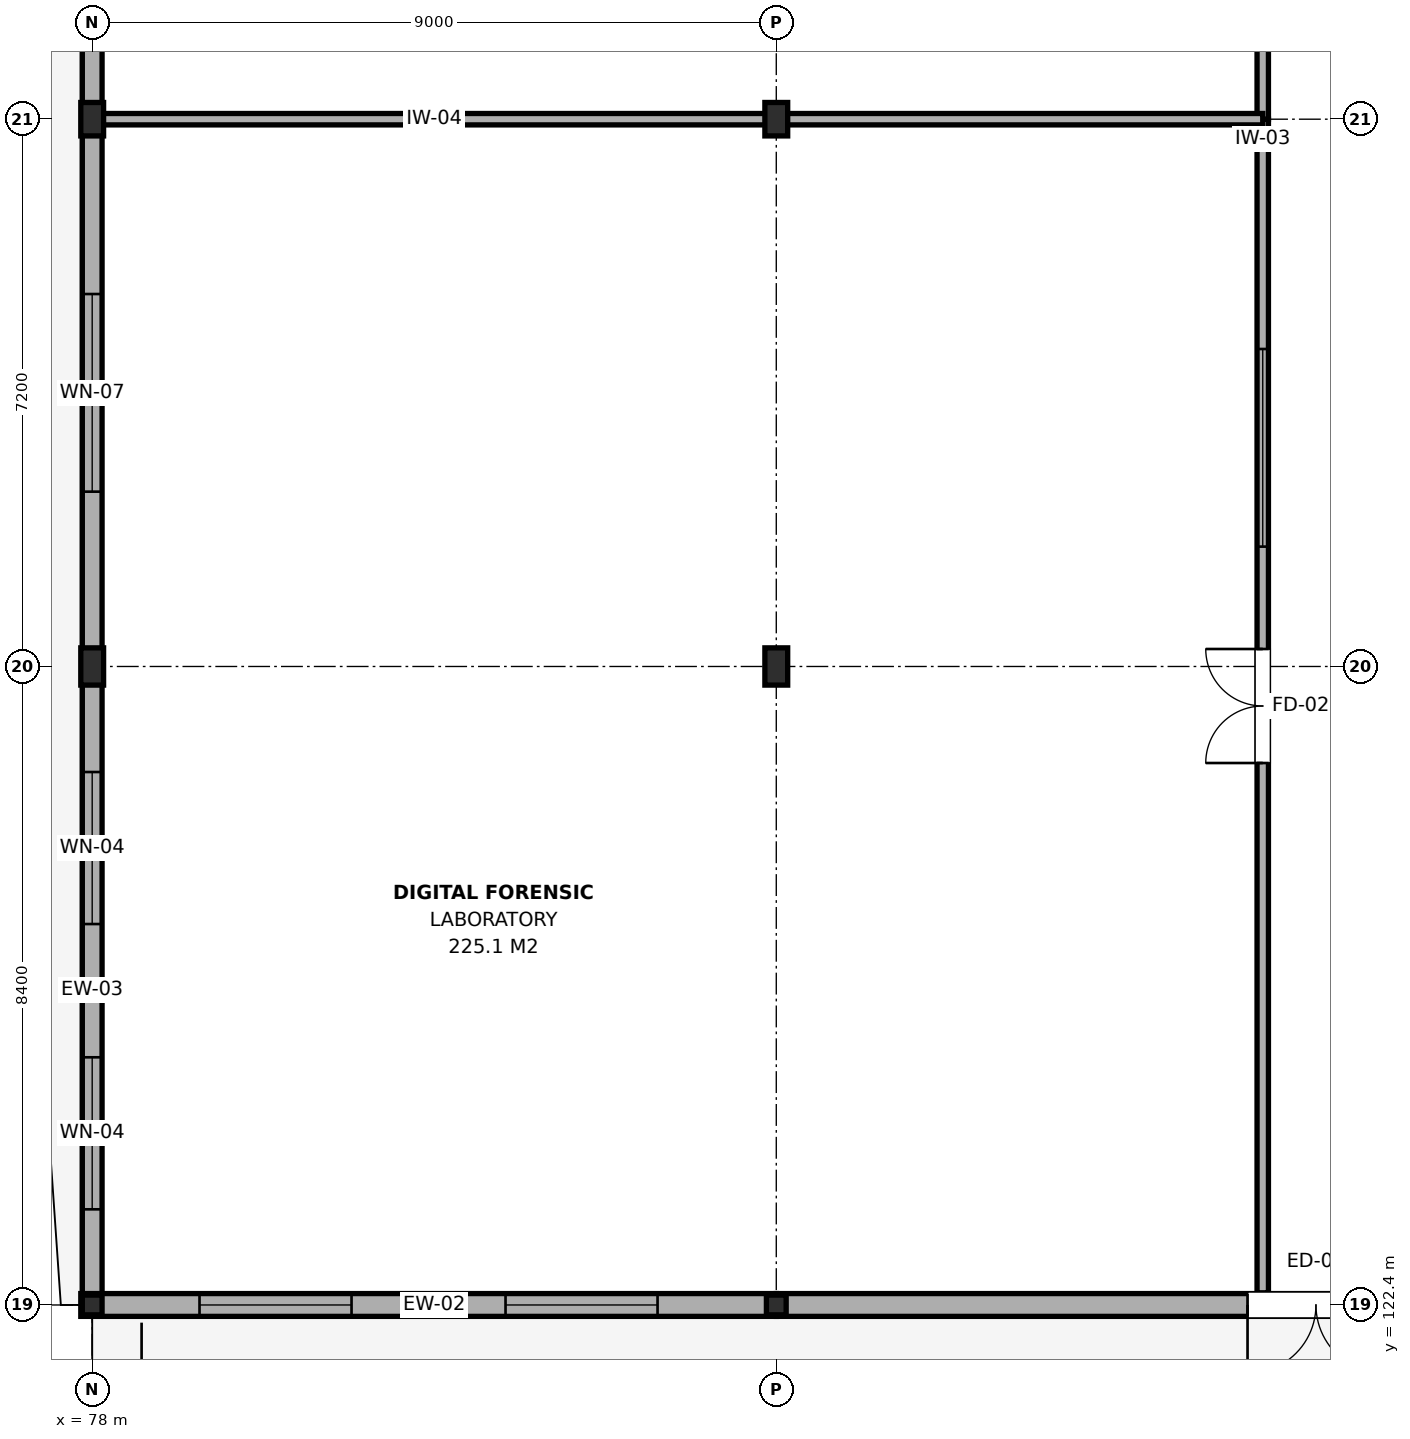
"""IFC4 building model, lengths in metres.
Left out: names, types, materials, properties, quantities, classifications, styles, units other than length and angle.
Written with IfcOpenShell. Run it as: python <this file> out.ifc"""

import sys

from ifc_helpers import new_model, si_unit, direction, frame, frame_2d, origin, origin_2d, place, context, subcontext, project, spatial, rectangle, i_section, extrude, element, fill, save


model = new_model("IFC4")
c1 = context("Model", 3, precision=1e-05, world=origin(), true_north=direction((0.0, 1.0)))
c2 = subcontext(c1, "Body", "Model", "MODEL_VIEW")
j1 = project(units=[si_unit("LENGTHUNIT", "METRE"), si_unit("PLANEANGLEUNIT", "RADIAN")], contexts=[c1])
p1 = place(None, origin())
s1 = spatial("IfcSite", under=j1, at=p1, CompositionType="ELEMENT")
p2 = place(p1, origin())
s2 = spatial("IfcBuilding", under=s1, at=p2, CompositionType="ELEMENT")
p3 = place(p2, frame((0.0, 0.0, 13.2)))
s3 = spatial("IfcBuildingStorey", under=s2, at=p3, CompositionType="ELEMENT", Elevation=13.2)
p4 = place(p3, frame((78.0, 122.4, 0.0), z_axis=(0.0, 0.0, 1.0), x_axis=(1.0, 0.0, 0.0)))
e1 = element("IfcColumn", 1, at=p4, inside=s3, PredefinedType="COLUMN", context=c2, shape_type="SweptSolid", body=[
    extrude(i_section(OverallWidth=0.26, OverallDepth=0.26, WebThickness=0.01, FlangeThickness=0.018, FilletRadius=0.024, at=origin_2d()), origin(), (0.0, 0.0, 1.0), 3.9),
])
p5 = place(p3, frame((78.0, 130.8, 0.0), z_axis=(0.0, 0.0, 1.0), x_axis=(1.0, 0.0, 0.0)))
e2 = element("IfcColumn", 2, at=p5, inside=s3, PredefinedType="COLUMN", context=c2, shape_type="SweptSolid", body=[
    extrude(i_section(OverallWidth=0.3, OverallDepth=0.49, WebThickness=0.012, FlangeThickness=0.023, FilletRadius=0.027, at=origin_2d()), origin(), (0.0, 0.0, 1.0), 3.9),
])
p6 = place(p3, frame((78.0, 138.0, 0.0), z_axis=(0.0, 0.0, 1.0), x_axis=(1.0, 0.0, 0.0)))
e3 = element("IfcColumn", 3, at=p6, inside=s3, PredefinedType="COLUMN", context=c2, shape_type="SweptSolid", body=[
    extrude(i_section(OverallWidth=0.3, OverallDepth=0.44, WebThickness=0.011, FlangeThickness=0.021, FilletRadius=0.027, at=origin_2d()), origin(), (0.0, 0.0, 1.0), 3.9),
])
p7 = place(p3, frame((87.0, 122.4, 0.0), z_axis=(0.0, 0.0, 1.0), x_axis=(1.0, 0.0, 0.0)))
e4 = element("IfcColumn", 4, at=p7, inside=s3, PredefinedType="COLUMN", context=c2, shape_type="SweptSolid", body=[
    extrude(i_section(OverallWidth=0.26, OverallDepth=0.26, WebThickness=0.01, FlangeThickness=0.018, FilletRadius=0.024, at=origin_2d()), origin(), (0.0, 0.0, 1.0), 3.9),
])
p8 = place(p3, frame((87.0, 130.8, 0.0), z_axis=(0.0, 0.0, 1.0), x_axis=(1.0, 0.0, 0.0)))
e5 = element("IfcColumn", 5, at=p8, inside=s3, PredefinedType="COLUMN", context=c2, shape_type="SweptSolid", body=[
    extrude(i_section(OverallWidth=0.3, OverallDepth=0.49, WebThickness=0.012, FlangeThickness=0.023, FilletRadius=0.027, at=origin_2d()), origin(), (0.0, 0.0, 1.0), 3.9),
])
p9 = place(p3, frame((87.0, 138.0, 0.0), z_axis=(0.0, 0.0, 1.0), x_axis=(1.0, 0.0, 0.0)))
e6 = element("IfcColumn", 6, at=p9, inside=s3, PredefinedType="COLUMN", context=c2, shape_type="SweptSolid", body=[
    extrude(i_section(OverallWidth=0.3, OverallDepth=0.44, WebThickness=0.011, FlangeThickness=0.021, FilletRadius=0.027, at=origin_2d()), origin(), (0.0, 0.0, 1.0), 3.9),
])
p10 = place(p3, frame((78.0, 122.27, 0.0), z_axis=(0.0, 0.0, 1.0), x_axis=(0.0, 1.0, 0.0)))
e7 = element("IfcWall", 7, at=p10, inside=s3, PredefinedType="SOLIDWALL", context=c2, shape_type="SweptSolid", body=[
    extrude(rectangle(XDim=8.53, YDim=0.26, at=frame_2d((4.265, 0.0))), origin(), (0.0, 0.0, 1.0), 3.095),
])
p11 = place(p10, frame((1.388, 0.0, 1.05)))
e8 = element("IfcOpeningElement", 8, at=p11, cuts=e7, PredefinedType="OPENING", context=c2, shape_type="SweptSolid", body=[
    extrude(rectangle(XDim=2.0, YDim=1.8, at=frame_2d((1.0, 0.9))), frame((0.0, 0.145, 0.0), z_axis=(0.0, -1.0, 0.0), x_axis=(1.0, 0.0, 0.0)), (0.0, 0.0, 1.0), 0.29),
])
p12 = place(p10, frame((5.142, 0.0, 1.05)))
e9 = element("IfcOpeningElement", 9, at=p12, cuts=e7, PredefinedType="OPENING", context=c2, shape_type="SweptSolid", body=[
    extrude(rectangle(XDim=2.0, YDim=1.8, at=frame_2d((1.0, 0.9))), frame((0.0, 0.145, 0.0), z_axis=(0.0, -1.0, 0.0), x_axis=(1.0, 0.0, 0.0)), (0.0, 0.0, 1.0), 0.29),
])
p13 = place(p3, frame((78.0, 130.8, 0.0), z_axis=(0.0, 0.0, 1.0), x_axis=(0.0, 1.0, 0.0)))
e10 = element("IfcWall", 10, at=p13, inside=s3, PredefinedType="SOLIDWALL", context=c2, shape_type="SweptSolid", body=[
    extrude(rectangle(XDim=7.2, YDim=0.26, at=frame_2d((3.6, 0.0))), origin(), (0.0, 0.0, 1.0), 3.095),
])
p14 = place(p13, frame((2.3, 0.0, 1.05)))
e11 = element("IfcOpeningElement", 11, at=p14, cuts=e10, PredefinedType="OPENING", context=c2, shape_type="SweptSolid", body=[
    extrude(rectangle(XDim=2.6, YDim=1.5, at=frame_2d((1.3, 0.75))), frame((0.0, 0.145, 0.0), z_axis=(0.0, -1.0, 0.0), x_axis=(1.0, 0.0, 0.0)), (0.0, 0.0, 1.0), 0.29),
])
p15 = place(p3, frame((78.0, 138.0, 0.0), z_axis=(0.0, 0.0, 1.0), x_axis=(0.0, 1.0, 0.0)))
e12 = element("IfcWall", 12, at=p15, inside=s3, PredefinedType="SOLIDWALL", context=c2, shape_type="SweptSolid", body=[
    extrude(rectangle(XDim=7.2, YDim=0.26, at=frame_2d((3.6, 0.0))), origin(), (0.0, 0.0, 1.0), 3.095),
])
p16 = place(p15, frame((2.3, 0.0, 1.05)))
e13 = element("IfcOpeningElement", 13, at=p16, cuts=e12, PredefinedType="OPENING", context=c2, shape_type="SweptSolid", body=[
    extrude(rectangle(XDim=2.6, YDim=1.5, at=frame_2d((1.3, 0.75))), frame((0.0, 0.145, 0.0), z_axis=(0.0, -1.0, 0.0), x_axis=(1.0, 0.0, 0.0)), (0.0, 0.0, 1.0), 0.29),
])
p17 = place(p3, frame((77.85, 122.4, 0.0), z_axis=(0.0, 0.0, 1.0), x_axis=(1.0, 0.0, 0.0)))
e14 = element("IfcWall", 14, at=p17, inside=s3, PredefinedType="SOLIDWALL", context=c2, shape_type="SweptSolid", body=[
    extrude(rectangle(XDim=9.15, YDim=0.3, at=frame_2d((4.575, 0.0))), origin(), (0.0, 0.0, 1.0), 3.205),
])
p18 = place(p17, frame((1.562, 0.0, 0.65)))
e15 = element("IfcOpeningElement", 15, at=p18, cuts=e14, PredefinedType="OPENING", context=c2, shape_type="SweptSolid", body=[
    extrude(rectangle(XDim=2.0, YDim=1.8, at=frame_2d((1.0, 0.9))), frame((0.0, 0.165, 0.0), z_axis=(0.0, -1.0, 0.0), x_axis=(1.0, 0.0, 0.0)), (0.0, 0.0, 1.0), 0.33),
])
p19 = place(p17, frame((5.588, 0.0, 0.65)))
e16 = element("IfcOpeningElement", 16, at=p19, cuts=e14, PredefinedType="OPENING", context=c2, shape_type="SweptSolid", body=[
    extrude(rectangle(XDim=2.0, YDim=1.8, at=frame_2d((1.0, 0.9))), frame((0.0, 0.165, 0.0), z_axis=(0.0, -1.0, 0.0), x_axis=(1.0, 0.0, 0.0)), (0.0, 0.0, 1.0), 0.33),
])
p20 = place(p3, frame((87.0, 122.4, 0.0), z_axis=(0.0, 0.0, 1.0), x_axis=(1.0, 0.0, 0.0)))
e17 = element("IfcWall", 17, at=p20, inside=s3, PredefinedType="SOLIDWALL", context=c2, shape_type="SweptSolid", body=[
    extrude(rectangle(XDim=9.0, YDim=0.3, at=frame_2d((4.5, 0.0))), origin(), (0.0, 0.0, 1.0), 3.205),
])
p21 = place(p20, frame((6.2, 0.0, 0.0)))
e18 = element("IfcOpeningElement", 18, at=p21, cuts=e17, PredefinedType="OPENING", context=c2, shape_type="SweptSolid", body=[
    extrude(rectangle(XDim=1.8, YDim=2.2, at=frame_2d((0.9, 1.1))), frame((0.0, 0.165, 0.0), z_axis=(0.0, -1.0, 0.0), x_axis=(1.0, 0.0, 0.0)), (0.0, 0.0, 1.0), 0.33),
])
p22 = place(p3, frame((93.4, 122.56, 0.0), z_axis=(0.0, 0.0, 1.0), x_axis=(0.0, 1.0, 0.0)))
e19 = element("IfcWall", 19, at=p22, inside=s3, PredefinedType="PARTITIONING", context=c2, shape_type="SweptSolid", body=[
    extrude(rectangle(XDim=15.44, YDim=0.15, at=frame_2d((7.72, 0.0))), origin(), (0.0, 0.0, 1.0), 3.205),
])
p23 = place(p22, frame((6.97, 0.0, 0.0)))
e20 = element("IfcOpeningElement", 20, at=p23, cuts=e19, PredefinedType="OPENING", context=c2, shape_type="SweptSolid", body=[
    extrude(rectangle(XDim=1.5, YDim=2.15, at=frame_2d((0.75, 1.075))), frame((0.0, 0.09, 0.0), z_axis=(0.0, -1.0, 0.0), x_axis=(1.0, 0.0, 0.0)), (0.0, 0.0, 1.0), 0.18),
])
p24 = place(p22, frame((9.817, 0.0, 0.95)))
e21 = element("IfcOpeningElement", 21, at=p24, cuts=e19, PredefinedType="OPENING", context=c2, shape_type="SweptSolid", body=[
    extrude(rectangle(XDim=2.6, YDim=1.5, at=frame_2d((1.3, 0.75))), frame((0.0, 0.09, 0.0), z_axis=(0.0, -1.0, 0.0), x_axis=(1.0, 0.0, 0.0)), (0.0, 0.0, 1.0), 0.18),
])
p25 = place(p3, frame((93.4, 138.0, 0.0), z_axis=(0.0, 0.0, 1.0), x_axis=(0.0, 1.0, 0.0)))
e22 = element("IfcWall", 22, at=p25, inside=s3, PredefinedType="PARTITIONING", context=c2, shape_type="SweptSolid", body=[
    extrude(rectangle(XDim=14.4, YDim=0.15, at=frame_2d((7.2, 0.0))), origin(), (0.0, 0.0, 1.0), 3.105),
])
p26 = place(p25, frame((6.45, 0.0, 0.0)))
e23 = element("IfcOpeningElement", 23, at=p26, cuts=e22, PredefinedType="OPENING", context=c2, shape_type="SweptSolid", body=[
    extrude(rectangle(XDim=1.5, YDim=2.15, at=frame_2d((0.75, 1.075))), frame((0.0, 0.09, 0.0), z_axis=(0.0, -1.0, 0.0), x_axis=(1.0, 0.0, 0.0)), (0.0, 0.0, 1.0), 0.18),
])
p27 = place(p3, frame((78.14, 138.0, 0.0), z_axis=(0.0, 0.0, 1.0), x_axis=(1.0, 0.0, 0.0)))
e24 = element("IfcWall", 24, at=p27, inside=s3, PredefinedType="PARTITIONING", context=c2, shape_type="SweptSolid", body=[
    extrude(rectangle(XDim=15.26, YDim=0.15, at=frame_2d((7.63, 0.0))), origin(), (0.0, 0.0, 1.0), 3.155),
])
p28 = place(p11, origin())
e25 = element("IfcWindow", 25, at=p28, inside=s3, PartitioningType="SINGLE_PANEL", PredefinedType="WINDOW", context=c2, shape_type="SweptSolid", body=[
    extrude(rectangle(XDim=2.0, YDim=1.8, at=frame_2d((1.0, 0.9))), frame((0.0, 0.03, 0.0), z_axis=(0.0, -1.0, 0.0), x_axis=(1.0, 0.0, 0.0)), (0.0, 0.0, 1.0), 0.06),
])
fill(e8, e25)
p29 = place(p12, origin())
e26 = element("IfcWindow", 26, at=p29, inside=s3, PartitioningType="SINGLE_PANEL", PredefinedType="WINDOW", context=c2, shape_type="SweptSolid", body=[
    extrude(rectangle(XDim=2.0, YDim=1.8, at=frame_2d((1.0, 0.9))), frame((0.0, 0.03, 0.0), z_axis=(0.0, -1.0, 0.0), x_axis=(1.0, 0.0, 0.0)), (0.0, 0.0, 1.0), 0.06),
])
fill(e9, e26)
p30 = place(p14, origin())
e27 = element("IfcWindow", 27, at=p30, inside=s3, PartitioningType="SINGLE_PANEL", PredefinedType="WINDOW", context=c2, shape_type="SweptSolid", body=[
    extrude(rectangle(XDim=2.6, YDim=1.5, at=frame_2d((1.3, 0.75))), frame((0.0, 0.03, 0.0), z_axis=(0.0, -1.0, 0.0), x_axis=(1.0, 0.0, 0.0)), (0.0, 0.0, 1.0), 0.06),
])
fill(e11, e27)
p31 = place(p18, origin())
e28 = element("IfcWindow", 28, at=p31, inside=s3, PartitioningType="SINGLE_PANEL", PredefinedType="WINDOW", context=c2, shape_type="SweptSolid", body=[
    extrude(rectangle(XDim=2.0, YDim=1.8, at=frame_2d((1.0, 0.9))), frame((0.0, 0.03, 0.0), z_axis=(0.0, -1.0, 0.0), x_axis=(1.0, 0.0, 0.0)), (0.0, 0.0, 1.0), 0.06),
])
fill(e15, e28)
p32 = place(p19, origin())
e29 = element("IfcWindow", 29, at=p32, inside=s3, PartitioningType="SINGLE_PANEL", PredefinedType="WINDOW", context=c2, shape_type="SweptSolid", body=[
    extrude(rectangle(XDim=2.0, YDim=1.8, at=frame_2d((1.0, 0.9))), frame((0.0, 0.03, 0.0), z_axis=(0.0, -1.0, 0.0), x_axis=(1.0, 0.0, 0.0)), (0.0, 0.0, 1.0), 0.06),
])
fill(e16, e29)
p33 = place(p21, frame((1.8, 0.0, 0.0), z_axis=(0.0, 0.0, 1.0), x_axis=(-1.0, 0.0, 0.0)))
e30 = element("IfcDoor", 30, at=p33, inside=s3, OperationType="DOUBLE_DOOR_SINGLE_SWING", PredefinedType="DOOR", context=c2, shape_type="SweptSolid", body=[
    extrude(rectangle(XDim=1.8, YDim=2.2, at=frame_2d((0.9, 1.1))), frame((0.0, 0.025, 0.0), z_axis=(0.0, -1.0, 0.0), x_axis=(1.0, 0.0, 0.0)), (0.0, 0.0, 1.0), 0.05),
])
fill(e18, e30)
p34 = place(p23, origin())
e31 = element("IfcDoor", 31, at=p34, inside=s3, OperationType="DOUBLE_DOOR_SINGLE_SWING", PredefinedType="DOOR", context=c2, shape_type="SweptSolid", body=[
    extrude(rectangle(XDim=1.5, YDim=2.15, at=frame_2d((0.75, 1.075))), frame((0.0, 0.025, 0.0), z_axis=(0.0, -1.0, 0.0), x_axis=(1.0, 0.0, 0.0)), (0.0, 0.0, 1.0), 0.05),
])
fill(e20, e31)
p35 = place(p24, origin())
e32 = element("IfcWindow", 32, at=p35, inside=s3, PartitioningType="SINGLE_PANEL", PredefinedType="WINDOW", context=c2, shape_type="SweptSolid", body=[
    extrude(rectangle(XDim=2.6, YDim=1.5, at=frame_2d((1.3, 0.75))), frame((0.0, 0.03, 0.0), z_axis=(0.0, -1.0, 0.0), x_axis=(1.0, 0.0, 0.0)), (0.0, 0.0, 1.0), 0.06),
])
fill(e21, e32)
save(model, sys.argv[1])
